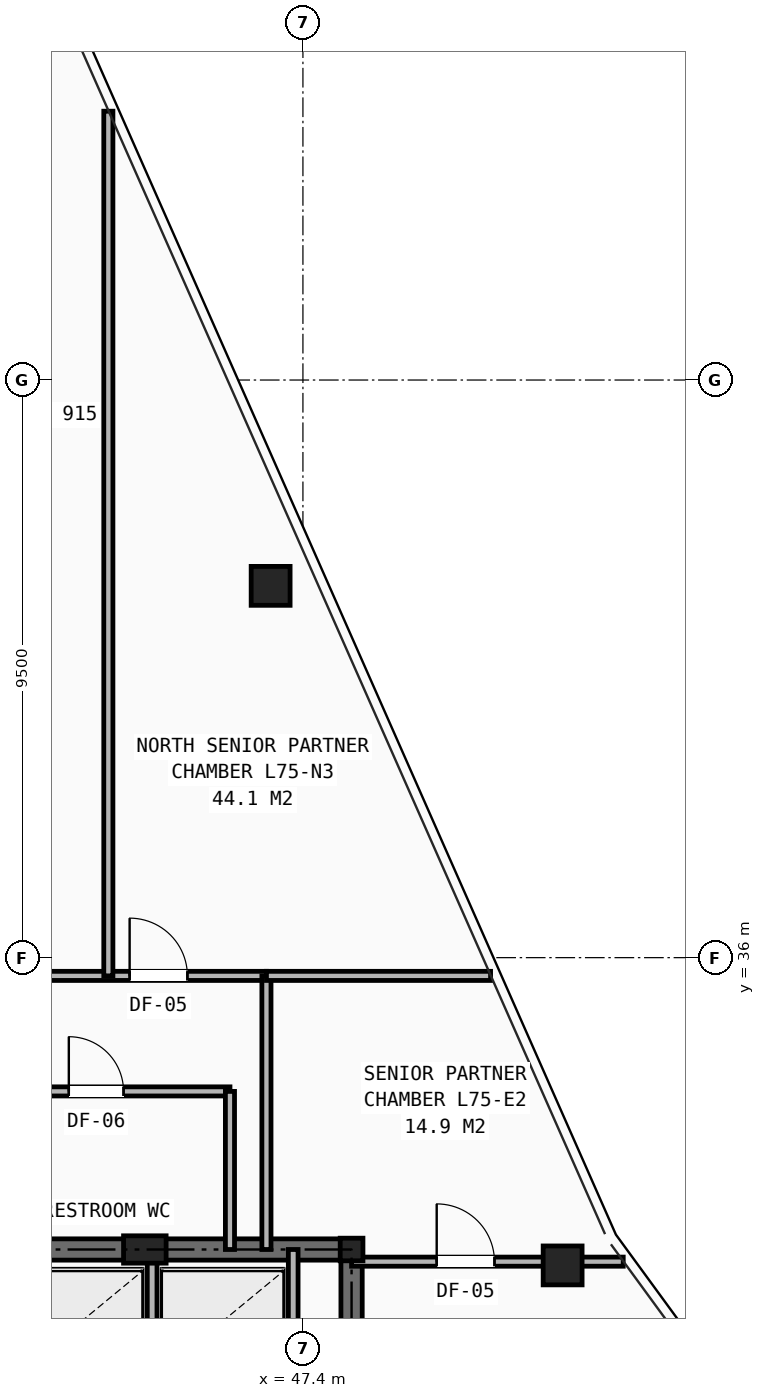
"""IFC4 building model, lengths in metres.
Left out: names, types, materials, properties, quantities, classifications, styles, units other than length and angle.
Written with IfcOpenShell. Run it as: python <this file> out.ifc"""

import sys

from ifc_helpers import new_model, si_unit, direction, frame, frame_2d, origin, origin_2d, place, context, subcontext, project, spatial, rectangle, hollow_rectangle, i_section, extrude, element, fill, save


model = new_model("IFC4")
c1 = context("Model", 3, precision=1e-05, world=origin(), true_north=direction((0.0, 1.0)))
c2 = subcontext(c1, "Body", "Model", "MODEL_VIEW")
j1 = project(units=[si_unit("LENGTHUNIT", "METRE"), si_unit("PLANEANGLEUNIT", "RADIAN")], contexts=[c1])
p1 = place(None, origin())
s1 = spatial("IfcSite", under=j1, at=p1, CompositionType="ELEMENT")
p2 = place(p1, origin())
s2 = spatial("IfcBuilding", under=s1, at=p2, CompositionType="ELEMENT")
p3 = place(p2, frame((0.0, 0.0, 265.5)))
s3 = spatial("IfcBuildingStorey", under=s2, at=p3, CompositionType="ELEMENT", Elevation=265.5)
p4 = place(p3, frame((48.2, 31.2, 0.0), z_axis=(0.0, 0.0, 1.0), x_axis=(1.0, 0.0, 0.0)))
e1 = element("IfcColumn", 1, at=p4, inside=s3, PredefinedType="COLUMN", context=c2, shape_type="SweptSolid", body=[
    extrude(i_section(OverallWidth=0.374, OverallDepth=0.372, WebThickness=0.016, FlangeThickness=0.026, at=origin_2d()), origin(), (0.0, 0.0, 1.0), 3.5),
])
p5 = place(p3, frame((44.8, 31.2, 0.0), z_axis=(0.0, 0.0, 1.0), x_axis=(1.0, 0.0, 0.0)))
e2 = element("IfcColumn", 2, at=p5, inside=s3, PredefinedType="PILASTER", context=c2, shape_type="SweptSolid", body=[
    extrude(rectangle(XDim=0.7, YDim=0.45, at=origin_2d()), origin(), (0.0, 0.0, 1.0), 3.5),
])
for number, where, z_axis, x_axis in (
    (3, (51.671, 30.938, 0.0), (0.0, 0.0, 1.0), (1.0, 0.0, 0.0)),
    (4, (46.869, 42.115, 0.0), (0.0, 0.0, 1.0), (1.0, 0.0, 0.0)),
):
    element("IfcColumn", number, at=place(p3, frame(where, z_axis=z_axis, x_axis=x_axis)), inside=s3, PredefinedType="COLUMN", context=c2, shape_type="SweptSolid", body=[
        extrude(hollow_rectangle(XDim=0.64, YDim=0.64, WallThickness=0.045, at=origin_2d()), origin(), (0.0, 0.0, 1.0), 3.5),
    ])
p6 = place(p3, frame((31.8, 31.2, 0.0), z_axis=(0.0, 0.0, 1.0), x_axis=(1.0, 0.0, 0.0)))
e5 = element("IfcWall", 5, at=p6, inside=s3, PredefinedType="SHEAR", context=c2, shape_type="SweptSolid", body=[
    extrude(rectangle(XDim=16.4, YDim=0.35, at=frame_2d((8.2, 0.0))), origin(), (0.0, 0.0, 1.0), 3.25),
])
p7 = place(p3, frame((48.2, 16.4, 0.0), z_axis=(0.0, 0.0, 1.0), x_axis=(0.0, 1.0, 0.0)))
e6 = element("IfcWall", 6, at=p7, inside=s3, PredefinedType="SHEAR", context=c2, shape_type="SweptSolid", body=[
    extrude(rectangle(XDim=14.8, YDim=0.35, at=frame_2d((7.4, 0.0))), origin(), (0.0, 0.0, 1.0), 3.25),
])
p8 = place(p7, frame((11.0, 0.0, 0.0)))
e7 = element("IfcOpeningElement", 7, at=p8, cuts=e6, PredefinedType="OPENING", context=c2, shape_type="SweptSolid", body=[
    extrude(rectangle(XDim=1.1, YDim=2.15, at=frame_2d((0.55, 1.075))), frame((0.0, 0.185, 0.0), z_axis=(0.0, -1.0, 0.0), x_axis=(1.0, 0.0, 0.0)), (0.0, 0.0, 1.0), 0.37),
])
for number, where, z_axis, x_axis in (
    (8, (44.92, 29.02, 0.0), (0.0, 0.0, 1.0), (0.0, 1.0, 0.0)),
    (9, (47.24, 29.02, 0.0), (0.0, 0.0, 1.0), (0.0, 1.0, 0.0)),
):
    element("IfcWall", number, at=place(p3, frame(where, z_axis=z_axis, x_axis=x_axis)), inside=s3, PredefinedType="SOLIDWALL", context=c2, shape_type="SweptSolid", body=[
        extrude(rectangle(XDim=2.18, YDim=0.16, at=frame_2d((1.09, 0.0))), origin(), (0.0, 0.0, 1.0), 2.978),
    ])
p9 = place(p3, frame((33.2, 33.8, 0.0), z_axis=(0.0, 0.0, 1.0), x_axis=(1.0, 0.0, 0.0)))
e10 = element("IfcWall", 10, at=p9, inside=s3, PredefinedType="PARTITIONING", context=c2, shape_type="SweptSolid", body=[
    extrude(rectangle(XDim=13.0, YDim=0.15, at=frame_2d((6.5, 0.0))), origin(), (0.0, 0.0, 1.0), 3.25),
])
p10 = place(p9, frame((1.7, 0.0, 0.0)))
e11 = element("IfcOpeningElement", 11, at=p10, cuts=e10, PredefinedType="OPENING", context=c2, shape_type="SweptSolid", body=[
    extrude(rectangle(XDim=0.9, YDim=2.1, at=frame_2d((0.45, 1.05))), frame((0.0, 0.085, 0.0), z_axis=(0.0, -1.0, 0.0), x_axis=(1.0, 0.0, 0.0)), (0.0, 0.0, 1.0), 0.17),
])
p11 = place(p9, frame((6.0, 0.0, 0.0)))
e12 = element("IfcOpeningElement", 12, at=p11, cuts=e10, PredefinedType="OPENING", context=c2, shape_type="SweptSolid", body=[
    extrude(rectangle(XDim=0.9, YDim=2.1, at=frame_2d((0.45, 1.05))), frame((0.0, 0.085, 0.0), z_axis=(0.0, -1.0, 0.0), x_axis=(1.0, 0.0, 0.0)), (0.0, 0.0, 1.0), 0.17),
])
p12 = place(p9, frame((10.35, 0.0, 0.0)))
e13 = element("IfcOpeningElement", 13, at=p12, cuts=e10, PredefinedType="OPENING", context=c2, shape_type="SweptSolid", body=[
    extrude(rectangle(XDim=0.9, YDim=2.1, at=frame_2d((0.45, 1.05))), frame((0.0, 0.085, 0.0), z_axis=(0.0, -1.0, 0.0), x_axis=(1.0, 0.0, 0.0)), (0.0, 0.0, 1.0), 0.17),
])
p13 = place(p3, frame((46.2, 31.2, 0.0), z_axis=(0.0, 0.0, 1.0), x_axis=(0.0, 1.0, 0.0)))
e14 = element("IfcWall", 14, at=p13, inside=s3, PredefinedType="PARTITIONING", context=c2, shape_type="SweptSolid", body=[
    extrude(rectangle(XDim=2.6, YDim=0.15, at=frame_2d((1.3, 0.0))), origin(), (0.0, 0.0, 1.0), 2.978),
])
p14 = place(p3, frame((40.75, 35.7, 0.0), z_axis=(0.0, 0.0, 1.0), x_axis=(1.0, 0.0, 0.0)))
e15 = element("IfcWall", 15, at=p14, inside=s3, PredefinedType="PARTITIONING", context=c2, shape_type="SweptSolid", body=[
    extrude(rectangle(XDim=6.05, YDim=0.15, at=frame_2d((3.025, 0.0))), origin(), (0.0, 0.0, 1.0), 3.25),
])
p15 = place(p14, frame((3.8, 0.0, 0.0)))
e16 = element("IfcOpeningElement", 16, at=p15, cuts=e15, PredefinedType="OPENING", context=c2, shape_type="SweptSolid", body=[
    extrude(rectangle(XDim=0.95, YDim=2.1, at=frame_2d((0.475, 1.05))), frame((0.0, 0.085, 0.0), z_axis=(0.0, -1.0, 0.0), x_axis=(1.0, 0.0, 0.0)), (0.0, 0.0, 1.0), 0.17),
])
p16 = place(p3, frame((46.8, 31.2, 0.0), z_axis=(0.0, 0.0, 1.0), x_axis=(0.0, 1.0, 0.0)))
e17 = element("IfcWall", 17, at=p16, inside=s3, PredefinedType="PARTITIONING", context=c2, shape_type="SweptSolid", body=[
    extrude(rectangle(XDim=4.5, YDim=0.15, at=frame_2d((2.25, 0.0))), origin(), (0.0, 0.0, 1.0), 2.978),
])
p17 = place(p3, frame((46.8, 35.7, 0.0), z_axis=(0.0, 0.0, 1.0), x_axis=(1.0, 0.0, 0.0)))
e18 = element("IfcWall", 18, at=p17, inside=s3, PredefinedType="PARTITIONING", context=c2, shape_type="SweptSolid", body=[
    extrude(rectangle(XDim=3.686, YDim=0.15, at=frame_2d((1.843, 0.0))), origin(), (0.0, 0.0, 1.0), 2.628),
])
p18 = place(p3, frame((48.2, 31.0, 0.0), z_axis=(0.0, 0.0, 1.0), x_axis=(1.0, 0.0, 0.0)))
e19 = element("IfcWall", 19, at=p18, inside=s3, PredefinedType="PARTITIONING", context=c2, shape_type="SweptSolid", body=[
    extrude(rectangle(XDim=4.468, YDim=0.15, at=frame_2d((2.234, 0.0))), origin(), (0.0, 0.0, 1.0), 2.292),
])
p19 = place(p18, frame((1.4, 0.0, 0.0)))
e20 = element("IfcOpeningElement", 20, at=p19, cuts=e19, PredefinedType="OPENING", context=c2, shape_type="SweptSolid", body=[
    extrude(rectangle(XDim=0.95, YDim=2.1, at=frame_2d((0.475, 1.05))), frame((0.0, 0.085, 0.0), z_axis=(0.0, -1.0, 0.0), x_axis=(1.0, 0.0, 0.0)), (0.0, 0.0, 1.0), 0.17),
])
p20 = place(p3, frame((44.2, 35.7, 0.0), z_axis=(0.0, 0.0, 1.0), x_axis=(0.0, 1.0, 0.0)))
e21 = element("IfcWall", 21, at=p20, inside=s3, PredefinedType="PARTITIONING", context=c2, shape_type="SweptSolid", body=[
    extrude(rectangle(XDim=14.221, YDim=0.15, at=frame_2d((7.111, 0.0))), origin(), (0.0, 0.0, 1.0), 2.292),
])
p21 = place(p12, origin())
e22 = element("IfcDoor", 22, at=p21, inside=s3, OperationType="SINGLE_SWING_LEFT", PredefinedType="DOOR", context=c2, shape_type="SweptSolid", body=[
    extrude(rectangle(XDim=0.9, YDim=2.1, at=frame_2d((0.45, 1.05))), frame((0.0, 0.025, 0.0), z_axis=(0.0, -1.0, 0.0), x_axis=(1.0, 0.0, 0.0)), (0.0, 0.0, 1.0), 0.05),
])
fill(e13, e22)
p22 = place(p19, origin())
e23 = element("IfcDoor", 23, at=p22, inside=s3, OperationType="SINGLE_SWING_LEFT", PredefinedType="DOOR", context=c2, shape_type="SweptSolid", body=[
    extrude(rectangle(XDim=0.95, YDim=2.1, at=frame_2d((0.475, 1.05))), frame((0.0, 0.025, 0.0), z_axis=(0.0, -1.0, 0.0), x_axis=(1.0, 0.0, 0.0)), (0.0, 0.0, 1.0), 0.05),
])
fill(e20, e23)
p23 = place(p15, origin())
e24 = element("IfcDoor", 24, at=p23, inside=s3, OperationType="SINGLE_SWING_LEFT", PredefinedType="DOOR", context=c2, shape_type="SweptSolid", body=[
    extrude(rectangle(XDim=0.95, YDim=2.1, at=frame_2d((0.475, 1.05))), frame((0.0, 0.025, 0.0), z_axis=(0.0, -1.0, 0.0), x_axis=(1.0, 0.0, 0.0)), (0.0, 0.0, 1.0), 0.05),
])
fill(e16, e24)
save(model, sys.argv[1])
